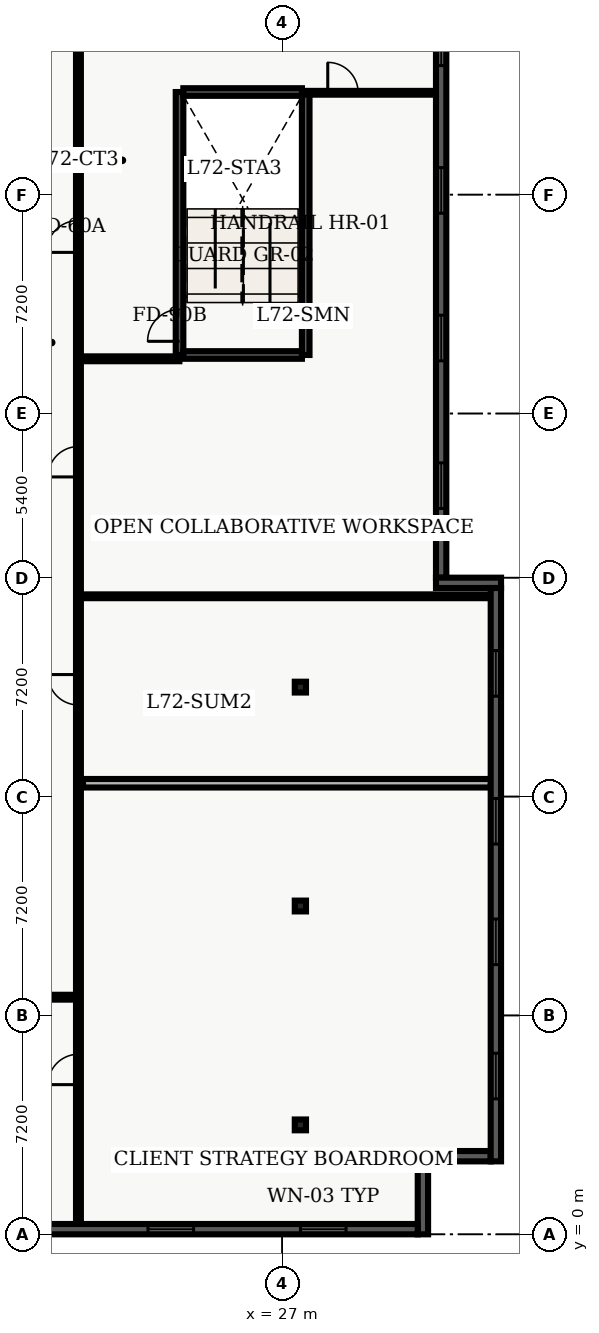
"""IFC4 building model, lengths in metres.
Left out: names, types, materials, properties, quantities, classifications, styles, units other than length and angle.
Written with IfcOpenShell. Run it as: python <this file> out.ifc"""

import sys

from ifc_helpers import new_model, entity, si_unit, converted_unit, direction, frame, origin_with_axes, origin_2d_with_axis, place, context, subcontext, project, spatial, polyline, rectangle, i_section, outline, extrude, element, fill, save


model = new_model("IFC4")
c1 = context("Model", 3, precision=1e-05, world=origin_with_axes(), true_north=direction((0.0, 1.0)))
c2 = subcontext(c1, "Body", "Model", "MODEL_VIEW")
j1 = project(units=[si_unit("LENGTHUNIT", "METRE"), converted_unit("PLANEANGLEUNIT", "DEGREE", entity("IfcPlaneAngleMeasure", 0.017), si_unit("PLANEANGLEUNIT", "RADIAN"), dimensions=[0, 0, 0, 0, 0, 0, 0])], contexts=[c1])
p1 = place(None, origin_with_axes())
s1 = spatial("IfcSite", under=j1, at=p1, CompositionType="ELEMENT")
p2 = place(p1, origin_with_axes())
s2 = spatial("IfcBuilding", under=s1, at=p2, CompositionType="ELEMENT")
p3 = place(p2, frame((0.0, 0.0, 291.9), z_axis=(0.0, 0.0, 1.0), x_axis=(1.0, 0.0, 0.0)))
s3 = spatial("IfcBuildingStorey", under=s2, at=p3, CompositionType="ELEMENT", Elevation=291.9)
p4 = place(p3, frame((23.625, 28.925, 0.0), z_axis=(0.0, 0.0, 1.0), x_axis=(0.0, 1.0, 0.0)))
e1 = element("IfcWall", 1, at=p4, inside=s3, PredefinedType="SHEAR", context=c2, shape_type="SweptSolid", body=[
    extrude(outline(polyline([(0.0, -0.125), (8.65, -0.125), (8.65, 0.125), (0.0, 0.125), (0.0, -0.125)])), origin_with_axes(), (0.0, 0.0, 1.0), 3.66),
])
p5 = place(p4, frame((0.975, 0.0, 0.0), z_axis=(0.0, 0.0, 1.0), x_axis=(1.0, 0.0, 0.0)))
e2 = element("IfcOpeningElement", 2, at=p5, cuts=e1, PredefinedType="OPENING", context=c2, shape_type="SweptSolid", body=[
    extrude(rectangle(XDim=1.05, YDim=0.27, at=origin_2d_with_axis()), origin_with_axes(), (0.0, 0.0, 1.0), 2.15),
])
p6 = place(p3, frame((27.775, 28.925, 0.0), z_axis=(0.0, 0.0, 1.0), x_axis=(0.0, 1.0, 0.0)))
e3 = element("IfcWall", 3, at=p6, inside=s3, PredefinedType="SHEAR", context=c2, shape_type="SweptSolid", body=[
    extrude(outline(polyline([(0.0, -0.125), (8.65, -0.125), (8.65, 0.125), (0.0, 0.125), (0.0, -0.125)])), origin_with_axes(), (0.0, 0.0, 1.0), 3.66),
])
for number, where, z_axis, x_axis in (
    (4, (23.75, 28.925, 0.0), (0.0, 0.0, 1.0), (1.0, 0.0, 0.0)),
    (5, (23.75, 37.575, 0.0), (0.0, 0.0, 1.0), (1.0, 0.0, 0.0)),
):
    element("IfcWall", number, at=place(p3, frame(where, z_axis=z_axis, x_axis=x_axis)), inside=s3, PredefinedType="SHEAR", context=c2, shape_type="SweptSolid", body=[
        extrude(outline(polyline([(0.0, -0.125), (3.9, -0.125), (3.9, 0.125), (0.0, 0.125), (0.0, -0.125)])), origin_with_axes(), (0.0, 0.0, 1.0), 3.66),
    ])
for number, where, z_axis, x_axis in (
    (6, (27.6, 3.6, 0.0), (0.0, 0.0, 1.0), (1.0, 0.0, 0.0)),
    (7, (27.6, 10.8, 0.0), (0.0, 0.0, 1.0), (1.0, 0.0, 0.0)),
    (8, (27.6, 18.0, 0.0), (0.0, 0.0, 1.0), (1.0, 0.0, 0.0)),
):
    element("IfcColumn", number, at=place(p3, frame(where, z_axis=z_axis, x_axis=x_axis)), inside=s3, PredefinedType="COLUMN", context=c2, shape_type="SweptSolid", body=[
        extrude(i_section(OverallWidth=0.369, OverallDepth=0.356, WebThickness=0.011, FlangeThickness=0.018, FilletRadius=0.018, at=origin_2d_with_axis()), origin_with_axes(), (0.0, 0.0, 1.0), 3.9),
    ])
p7 = place(p3, frame((8.135, 7.8, 0.0), z_axis=(0.0, 0.0, 1.0), x_axis=(1.0, 0.0, 0.0)))
e9 = element("IfcWall", 9, at=p7, inside=s3, PredefinedType="PARTITIONING", context=c2, shape_type="SweptSolid", body=[
    extrude(outline(polyline([(0.0, -0.08), (12.165, -0.08), (12.165, 0.08), (0.0, 0.08), (0.0, -0.08)])), origin_with_axes(), (0.0, 0.0, 1.0), 2.7),
])
p8 = place(p7, frame((3.983, 0.0, 0.0), z_axis=(0.0, 0.0, 1.0), x_axis=(1.0, 0.0, 0.0)))
e10 = element("IfcOpeningElement", 10, at=p8, cuts=e9, PredefinedType="OPENING", context=c2, shape_type="SweptSolid", body=[
    extrude(rectangle(XDim=1.0, YDim=0.18, at=origin_2d_with_axis()), origin_with_axes(), (0.0, 0.0, 1.0), 2.15),
])
p9 = place(p7, frame((8.784, 0.0, 0.0), z_axis=(0.0, 0.0, 1.0), x_axis=(1.0, 0.0, 0.0)))
e11 = element("IfcOpeningElement", 11, at=p9, cuts=e9, PredefinedType="OPENING", context=c2, shape_type="SweptSolid", body=[
    extrude(rectangle(XDim=1.0, YDim=0.18, at=origin_2d_with_axis()), origin_with_axes(), (0.0, 0.0, 1.0), 2.15),
])
p10 = place(p3, frame((20.3, 0.335, 0.0), z_axis=(0.0, 0.0, 1.0), x_axis=(0.0, 1.0, 0.0)))
e12 = element("IfcWall", 12, at=p10, inside=s3, PredefinedType="PARTITIONING", context=c2, shape_type="SweptSolid", body=[
    extrude(outline(polyline([(0.0, -0.08), (40.165, -0.08), (40.165, 0.08), (0.0, 0.08), (0.0, -0.08)])), origin_with_axes(), (0.0, 0.0, 1.0), 2.7),
])
p11 = place(p10, frame((32.49, 0.0, 0.0), z_axis=(0.0, 0.0, 1.0), x_axis=(1.0, 0.0, 0.0)))
e13 = element("IfcOpeningElement", 13, at=p11, cuts=e12, PredefinedType="OPENING", context=c2, shape_type="SweptSolid", body=[
    extrude(rectangle(XDim=1.05, YDim=0.18, at=origin_2d_with_axis()), origin_with_axes(), (0.0, 0.0, 1.0), 2.15),
])
p12 = place(p10, frame((5.089, 0.0, 0.0), z_axis=(0.0, 0.0, 1.0), x_axis=(1.0, 0.0, 0.0)))
e14 = element("IfcOpeningElement", 14, at=p12, cuts=e12, PredefinedType="OPENING", context=c2, shape_type="SweptSolid", body=[
    extrude(rectangle(XDim=1.0, YDim=0.18, at=origin_2d_with_axis()), origin_with_axes(), (0.0, 0.0, 1.0), 2.15),
])
p13 = place(p10, frame((17.578, 0.0, 0.0), z_axis=(0.0, 0.0, 1.0), x_axis=(1.0, 0.0, 0.0)))
e15 = element("IfcOpeningElement", 15, at=p13, cuts=e12, PredefinedType="OPENING", context=c2, shape_type="SweptSolid", body=[
    extrude(rectangle(XDim=1.0, YDim=0.18, at=origin_2d_with_axis()), origin_with_axes(), (0.0, 0.0, 1.0), 2.15),
])
p14 = place(p10, frame((25.079, 0.0, 0.0), z_axis=(0.0, 0.0, 1.0), x_axis=(1.0, 0.0, 0.0)))
e16 = element("IfcOpeningElement", 16, at=p14, cuts=e12, PredefinedType="OPENING", context=c2, shape_type="SweptSolid", body=[
    extrude(rectangle(XDim=1.0, YDim=0.18, at=origin_2d_with_axis()), origin_with_axes(), (0.0, 0.0, 1.0), 2.15),
])
p15 = place(p3, frame((20.3, 28.8, 0.0), z_axis=(0.0, 0.0, 1.0), x_axis=(1.0, 0.0, 0.0)))
e17 = element("IfcWall", 17, at=p15, inside=s3, PredefinedType="PARTITIONING", context=c2, shape_type="SweptSolid", body=[
    extrude(outline(polyline([(0.0, -0.08), (3.32, -0.08), (3.32, 0.08), (0.0, 0.08), (0.0, -0.08)])), origin_with_axes(), (0.0, 0.0, 1.0), 2.7),
])
p16 = place(p3, frame((20.45, 14.838, 0.0), z_axis=(0.0, 0.0, 1.0), x_axis=(1.0, 0.0, 0.0)))
e18 = element("IfcWall", 18, at=p16, inside=s3, PredefinedType="PARTITIONING", context=c2, shape_type="SweptSolid", body=[
    extrude(outline(polyline([(0.0, -0.14), (13.415, -0.14), (13.415, 0.14), (0.0, 0.14), (0.0, -0.14)])), origin_with_axes(), (0.0, 0.0, 1.0), 2.7),
])
p17 = place(p3, frame((20.45, 20.988, 0.0), z_axis=(0.0, 0.0, 1.0), x_axis=(1.0, 0.0, 0.0)))
e19 = element("IfcWall", 19, at=p17, inside=s3, PredefinedType="PARTITIONING", context=c2, shape_type="SweptSolid", body=[
    extrude(outline(polyline([(0.0, -0.062), (13.415, -0.062), (13.415, 0.062), (0.0, 0.062), (0.0, -0.062)])), origin_with_axes(), (0.0, 0.0, 1.0), 2.7),
])
p18 = place(p3, frame((27.85, 37.55, 0.0), z_axis=(0.0, 0.0, 1.0), x_axis=(1.0, 0.0, 0.0)))
e20 = element("IfcWall", 20, at=p18, inside=s3, PredefinedType="PARTITIONING", context=c2, shape_type="SweptSolid", body=[
    extrude(outline(polyline([(0.0, -0.062), (4.215, -0.062), (4.215, 0.062), (0.0, 0.062), (0.0, -0.062)])), origin_with_axes(), (0.0, 0.0, 1.0), 2.7),
])
p19 = place(p18, frame((1.15, 0.0, 0.0), z_axis=(0.0, 0.0, 1.0), x_axis=(1.0, 0.0, 0.0)))
e21 = element("IfcOpeningElement", 21, at=p19, cuts=e20, PredefinedType="OPENING", context=c2, shape_type="SweptSolid", body=[
    extrude(rectangle(XDim=1.0, YDim=0.145, at=origin_2d_with_axis()), origin_with_axes(), (0.0, 0.0, 1.0), 2.15),
])
p20 = place(p3, frame((33.86, 2.57, 0.0), z_axis=(0.0, 0.0, 1.0), x_axis=(-1.0, 0.0, 0.0)))
e22 = element("IfcWall", 22, at=p20, inside=s3, PredefinedType="SOLIDWALL", context=c2, shape_type="SweptSolid", body=[
    extrude(outline(polyline([(0.0, -0.17), (2.06, -0.17), (2.06, 0.17), (0.0, 0.17), (0.0, -0.17)])), origin_with_axes(), (0.0, 0.0, 1.0), 3.66),
])
p21 = place(p3, frame((31.63, 2.74, 0.0), z_axis=(0.0, 0.0, 1.0), x_axis=(0.0, -1.0, 0.0)))
e23 = element("IfcWall", 23, at=p21, inside=s3, PredefinedType="SOLIDWALL", context=c2, shape_type="SweptSolid", body=[
    extrude(outline(polyline([(0.0, -0.17), (2.74, -0.17), (2.74, 0.17), (0.0, 0.17), (0.0, -0.17)])), origin_with_axes(), (0.0, 0.0, 1.0), 3.66),
])
p22 = place(p3, frame((31.46, 0.17, 0.0), z_axis=(0.0, 0.0, 1.0), x_axis=(-1.0, 0.0, 0.0)))
e24 = element("IfcWall", 24, at=p22, inside=s3, PredefinedType="SOLIDWALL", context=c2, shape_type="SweptSolid", body=[
    extrude(outline(polyline([(0.0, -0.17), (21.26, -0.17), (21.26, 0.17), (0.0, 0.17), (0.0, -0.17)])), origin_with_axes(), (0.0, 0.0, 1.0), 3.66),
])
p23 = place(p22, frame((3.108, 0.0, 0.45), z_axis=(0.0, 0.0, 1.0), x_axis=(1.0, 0.0, 0.0)))
e25 = element("IfcOpeningElement", 25, at=p23, cuts=e24, PredefinedType="OPENING", context=c2, shape_type="SweptSolid", body=[
    extrude(rectangle(XDim=1.5, YDim=0.36, at=origin_2d_with_axis()), origin_with_axes(), (0.0, 0.0, 1.0), 2.1),
])
p24 = place(p22, frame((8.123, 0.0, 0.45), z_axis=(0.0, 0.0, 1.0), x_axis=(1.0, 0.0, 0.0)))
e26 = element("IfcOpeningElement", 26, at=p24, cuts=e24, PredefinedType="OPENING", context=c2, shape_type="SweptSolid", body=[
    extrude(rectangle(XDim=1.5, YDim=0.36, at=origin_2d_with_axis()), origin_with_axes(), (0.0, 0.0, 1.0), 2.1),
])
p25 = place(p22, frame((13.138, 0.0, 0.45), z_axis=(0.0, 0.0, 1.0), x_axis=(1.0, 0.0, 0.0)))
e27 = element("IfcOpeningElement", 27, at=p25, cuts=e24, PredefinedType="OPENING", context=c2, shape_type="SweptSolid", body=[
    extrude(rectangle(XDim=1.5, YDim=0.36, at=origin_2d_with_axis()), origin_with_axes(), (0.0, 0.0, 1.0), 2.1),
])
p26 = place(p22, frame((18.153, 0.0, 0.45), z_axis=(0.0, 0.0, 1.0), x_axis=(1.0, 0.0, 0.0)))
e28 = element("IfcOpeningElement", 28, at=p26, cuts=e24, PredefinedType="OPENING", context=c2, shape_type="SweptSolid", body=[
    extrude(rectangle(XDim=1.5, YDim=0.36, at=origin_2d_with_axis()), origin_with_axes(), (0.0, 0.0, 1.0), 2.1),
])
p27 = place(p3, frame((32.23, 42.22, 0.0), z_axis=(0.0, 0.0, 1.0), x_axis=(0.0, -1.0, 0.0)))
e29 = element("IfcWall", 29, at=p27, inside=s3, PredefinedType="SOLIDWALL", context=c2, shape_type="SweptSolid", body=[
    extrude(outline(polyline([(0.0, -0.17), (20.62, -0.17), (20.62, 0.17), (0.0, 0.17), (0.0, -0.17)])), origin_with_axes(), (0.0, 0.0, 1.0), 3.66),
])
p28 = place(p27, frame((3.027, 0.0, 0.45), z_axis=(0.0, 0.0, 1.0), x_axis=(1.0, 0.0, 0.0)))
e30 = element("IfcOpeningElement", 30, at=p28, cuts=e29, PredefinedType="OPENING", context=c2, shape_type="SweptSolid", body=[
    extrude(rectangle(XDim=1.5, YDim=0.36, at=origin_2d_with_axis()), origin_with_axes(), (0.0, 0.0, 1.0), 2.1),
])
p29 = place(p27, frame((7.882, 0.0, 0.45), z_axis=(0.0, 0.0, 1.0), x_axis=(1.0, 0.0, 0.0)))
e31 = element("IfcOpeningElement", 31, at=p29, cuts=e29, PredefinedType="OPENING", context=c2, shape_type="SweptSolid", body=[
    extrude(rectangle(XDim=1.5, YDim=0.36, at=origin_2d_with_axis()), origin_with_axes(), (0.0, 0.0, 1.0), 2.1),
])
p30 = place(p27, frame((12.737, 0.0, 0.45), z_axis=(0.0, 0.0, 1.0), x_axis=(1.0, 0.0, 0.0)))
e32 = element("IfcOpeningElement", 32, at=p30, cuts=e29, PredefinedType="OPENING", context=c2, shape_type="SweptSolid", body=[
    extrude(rectangle(XDim=1.5, YDim=0.36, at=origin_2d_with_axis()), origin_with_axes(), (0.0, 0.0, 1.0), 2.1),
])
p31 = place(p27, frame((17.593, 0.0, 0.45), z_axis=(0.0, 0.0, 1.0), x_axis=(1.0, 0.0, 0.0)))
e33 = element("IfcOpeningElement", 33, at=p31, cuts=e29, PredefinedType="OPENING", context=c2, shape_type="SweptSolid", body=[
    extrude(rectangle(XDim=1.5, YDim=0.36, at=origin_2d_with_axis()), origin_with_axes(), (0.0, 0.0, 1.0), 2.1),
])
p32 = place(p3, frame((32.06, 21.43, 0.0), z_axis=(0.0, 0.0, 1.0), x_axis=(1.0, 0.0, 0.0)))
e34 = element("IfcWall", 34, at=p32, inside=s3, PredefinedType="SOLIDWALL", context=c2, shape_type="SweptSolid", body=[
    extrude(outline(polyline([(0.0, -0.17), (2.14, -0.17), (2.14, 0.17), (0.0, 0.17), (0.0, -0.17)])), origin_with_axes(), (0.0, 0.0, 1.0), 3.66),
])
p33 = place(p3, frame((34.03, 21.26, 0.0), z_axis=(0.0, 0.0, 1.0), x_axis=(0.0, -1.0, 0.0)))
e35 = element("IfcWall", 35, at=p33, inside=s3, PredefinedType="SOLIDWALL", context=c2, shape_type="SweptSolid", body=[
    extrude(outline(polyline([(0.0, -0.17), (18.86, -0.17), (18.86, 0.17), (0.0, 0.17), (0.0, -0.17)])), origin_with_axes(), (0.0, 0.0, 1.0), 3.66),
])
p34 = place(p33, frame((2.808, 0.0, 0.45), z_axis=(0.0, 0.0, 1.0), x_axis=(1.0, 0.0, 0.0)))
e36 = element("IfcOpeningElement", 36, at=p34, cuts=e35, PredefinedType="OPENING", context=c2, shape_type="SweptSolid", body=[
    extrude(rectangle(XDim=1.5, YDim=0.36, at=origin_2d_with_axis()), origin_with_axes(), (0.0, 0.0, 1.0), 2.1),
])
p35 = place(p33, frame((7.673, 0.0, 0.45), z_axis=(0.0, 0.0, 1.0), x_axis=(1.0, 0.0, 0.0)))
e37 = element("IfcOpeningElement", 37, at=p35, cuts=e35, PredefinedType="OPENING", context=c2, shape_type="SweptSolid", body=[
    extrude(rectangle(XDim=1.5, YDim=0.36, at=origin_2d_with_axis()), origin_with_axes(), (0.0, 0.0, 1.0), 2.1),
])
p36 = place(p33, frame((11.638, 0.0, 0.45), z_axis=(0.0, 0.0, 1.0), x_axis=(1.0, 0.0, 0.0)))
e38 = element("IfcOpeningElement", 38, at=p36, cuts=e35, PredefinedType="OPENING", context=c2, shape_type="SweptSolid", body=[
    extrude(rectangle(XDim=1.5, YDim=0.36, at=origin_2d_with_axis()), origin_with_axes(), (0.0, 0.0, 1.0), 2.1),
])
p37 = place(p33, frame((16.053, 0.0, 0.45), z_axis=(0.0, 0.0, 1.0), x_axis=(1.0, 0.0, 0.0)))
e39 = element("IfcOpeningElement", 39, at=p37, cuts=e35, PredefinedType="OPENING", context=c2, shape_type="SweptSolid", body=[
    extrude(rectangle(XDim=1.5, YDim=0.36, at=origin_2d_with_axis()), origin_with_axes(), (0.0, 0.0, 1.0), 2.1),
])
p38 = place(p4, frame((0.975, 0.0, 0.0), z_axis=(0.0, 0.0, 1.0), x_axis=(1.0, 0.0, 0.0)))
e40 = element("IfcDoor", 40, at=p38, inside=s3, OperationType="SINGLE_SWING_LEFT", PredefinedType="DOOR", context=c2, shape_type="SweptSolid", body=[
    extrude(rectangle(XDim=1.05, YDim=0.09, at=origin_2d_with_axis()), origin_with_axes(), (0.0, 0.0, 1.0), 2.15),
])
fill(e2, e40)
p39 = place(p10, frame((32.49, 0.0, 0.0), z_axis=(0.0, 0.0, 1.0), x_axis=(1.0, 0.0, 0.0)))
e41 = element("IfcDoor", 41, at=p39, inside=s3, OperationType="SINGLE_SWING_LEFT", PredefinedType="DOOR", context=c2, shape_type="SweptSolid", body=[
    extrude(rectangle(XDim=1.05, YDim=0.09, at=origin_2d_with_axis()), origin_with_axes(), (0.0, 0.0, 1.0), 2.15),
])
fill(e13, e41)
p40 = place(p10, frame((5.089, 0.0, 0.0), z_axis=(0.0, 0.0, 1.0), x_axis=(1.0, 0.0, 0.0)))
e42 = element("IfcDoor", 42, at=p40, inside=s3, OperationType="SINGLE_SWING_LEFT", PredefinedType="DOOR", context=c2, shape_type="SweptSolid", body=[
    extrude(rectangle(XDim=1.0, YDim=0.09, at=origin_2d_with_axis()), origin_with_axes(), (0.0, 0.0, 1.0), 2.15),
])
fill(e14, e42)
p41 = place(p10, frame((17.578, 0.0, 0.0), z_axis=(0.0, 0.0, 1.0), x_axis=(1.0, 0.0, 0.0)))
e43 = element("IfcDoor", 43, at=p41, inside=s3, OperationType="SINGLE_SWING_RIGHT", PredefinedType="DOOR", context=c2, shape_type="SweptSolid", body=[
    extrude(rectangle(XDim=1.0, YDim=0.09, at=origin_2d_with_axis()), origin_with_axes(), (0.0, 0.0, 1.0), 2.15),
])
fill(e15, e43)
p42 = place(p10, frame((25.079, 0.0, 0.0), z_axis=(0.0, 0.0, 1.0), x_axis=(1.0, 0.0, 0.0)))
e44 = element("IfcDoor", 44, at=p42, inside=s3, OperationType="SINGLE_SWING_LEFT", PredefinedType="DOOR", context=c2, shape_type="SweptSolid", body=[
    extrude(rectangle(XDim=1.0, YDim=0.09, at=origin_2d_with_axis()), origin_with_axes(), (0.0, 0.0, 1.0), 2.15),
])
fill(e16, e44)
p43 = place(p18, frame((1.15, 0.0, 0.0), z_axis=(0.0, 0.0, 1.0), x_axis=(1.0, 0.0, 0.0)))
e45 = element("IfcDoor", 45, at=p43, inside=s3, OperationType="SINGLE_SWING_LEFT", PredefinedType="DOOR", context=c2, shape_type="SweptSolid", body=[
    extrude(rectangle(XDim=1.0, YDim=0.075, at=origin_2d_with_axis()), origin_with_axes(), (0.0, 0.0, 1.0), 2.15),
])
fill(e21, e45)
p44 = place(p22, frame((3.108, 0.0, 0.45), z_axis=(0.0, 0.0, 1.0), x_axis=(1.0, 0.0, 0.0)))
e46 = element("IfcWindow", 46, at=p44, inside=s3, PredefinedType="WINDOW", context=c2, shape_type="SweptSolid", body=[
    extrude(rectangle(XDim=1.5, YDim=0.09, at=origin_2d_with_axis()), origin_with_axes(), (0.0, 0.0, 1.0), 2.1),
])
fill(e25, e46)
p45 = place(p22, frame((8.123, 0.0, 0.45), z_axis=(0.0, 0.0, 1.0), x_axis=(1.0, 0.0, 0.0)))
e47 = element("IfcWindow", 47, at=p45, inside=s3, PredefinedType="WINDOW", context=c2, shape_type="SweptSolid", body=[
    extrude(rectangle(XDim=1.5, YDim=0.09, at=origin_2d_with_axis()), origin_with_axes(), (0.0, 0.0, 1.0), 2.1),
])
fill(e26, e47)
p46 = place(p27, frame((3.027, 0.0, 0.45), z_axis=(0.0, 0.0, 1.0), x_axis=(1.0, 0.0, 0.0)))
e48 = element("IfcWindow", 48, at=p46, inside=s3, PredefinedType="WINDOW", context=c2, shape_type="SweptSolid", body=[
    extrude(rectangle(XDim=1.5, YDim=0.09, at=origin_2d_with_axis()), origin_with_axes(), (0.0, 0.0, 1.0), 2.1),
])
fill(e30, e48)
p47 = place(p27, frame((7.882, 0.0, 0.45), z_axis=(0.0, 0.0, 1.0), x_axis=(1.0, 0.0, 0.0)))
e49 = element("IfcWindow", 49, at=p47, inside=s3, PredefinedType="WINDOW", context=c2, shape_type="SweptSolid", body=[
    extrude(rectangle(XDim=1.5, YDim=0.09, at=origin_2d_with_axis()), origin_with_axes(), (0.0, 0.0, 1.0), 2.1),
])
fill(e31, e49)
p48 = place(p27, frame((12.737, 0.0, 0.45), z_axis=(0.0, 0.0, 1.0), x_axis=(1.0, 0.0, 0.0)))
e50 = element("IfcWindow", 50, at=p48, inside=s3, PredefinedType="WINDOW", context=c2, shape_type="SweptSolid", body=[
    extrude(rectangle(XDim=1.5, YDim=0.09, at=origin_2d_with_axis()), origin_with_axes(), (0.0, 0.0, 1.0), 2.1),
])
fill(e32, e50)
p49 = place(p27, frame((17.593, 0.0, 0.45), z_axis=(0.0, 0.0, 1.0), x_axis=(1.0, 0.0, 0.0)))
e51 = element("IfcWindow", 51, at=p49, inside=s3, PredefinedType="WINDOW", context=c2, shape_type="SweptSolid", body=[
    extrude(rectangle(XDim=1.5, YDim=0.09, at=origin_2d_with_axis()), origin_with_axes(), (0.0, 0.0, 1.0), 2.1),
])
fill(e33, e51)
p50 = place(p33, frame((2.808, 0.0, 0.45), z_axis=(0.0, 0.0, 1.0), x_axis=(1.0, 0.0, 0.0)))
e52 = element("IfcWindow", 52, at=p50, inside=s3, PredefinedType="WINDOW", context=c2, shape_type="SweptSolid", body=[
    extrude(rectangle(XDim=1.5, YDim=0.09, at=origin_2d_with_axis()), origin_with_axes(), (0.0, 0.0, 1.0), 2.1),
])
fill(e36, e52)
p51 = place(p33, frame((7.673, 0.0, 0.45), z_axis=(0.0, 0.0, 1.0), x_axis=(1.0, 0.0, 0.0)))
e53 = element("IfcWindow", 53, at=p51, inside=s3, PredefinedType="WINDOW", context=c2, shape_type="SweptSolid", body=[
    extrude(rectangle(XDim=1.5, YDim=0.09, at=origin_2d_with_axis()), origin_with_axes(), (0.0, 0.0, 1.0), 2.1),
])
fill(e37, e53)
p52 = place(p33, frame((11.638, 0.0, 0.45), z_axis=(0.0, 0.0, 1.0), x_axis=(1.0, 0.0, 0.0)))
e54 = element("IfcWindow", 54, at=p52, inside=s3, PredefinedType="WINDOW", context=c2, shape_type="SweptSolid", body=[
    extrude(rectangle(XDim=1.5, YDim=0.09, at=origin_2d_with_axis()), origin_with_axes(), (0.0, 0.0, 1.0), 2.1),
])
fill(e38, e54)
p53 = place(p33, frame((16.053, 0.0, 0.45), z_axis=(0.0, 0.0, 1.0), x_axis=(1.0, 0.0, 0.0)))
e55 = element("IfcWindow", 55, at=p53, inside=s3, PredefinedType="WINDOW", context=c2, shape_type="SweptSolid", body=[
    extrude(rectangle(XDim=1.5, YDim=0.09, at=origin_2d_with_axis()), origin_with_axes(), (0.0, 0.0, 1.0), 2.1),
])
fill(e39, e55)
save(model, sys.argv[1])
